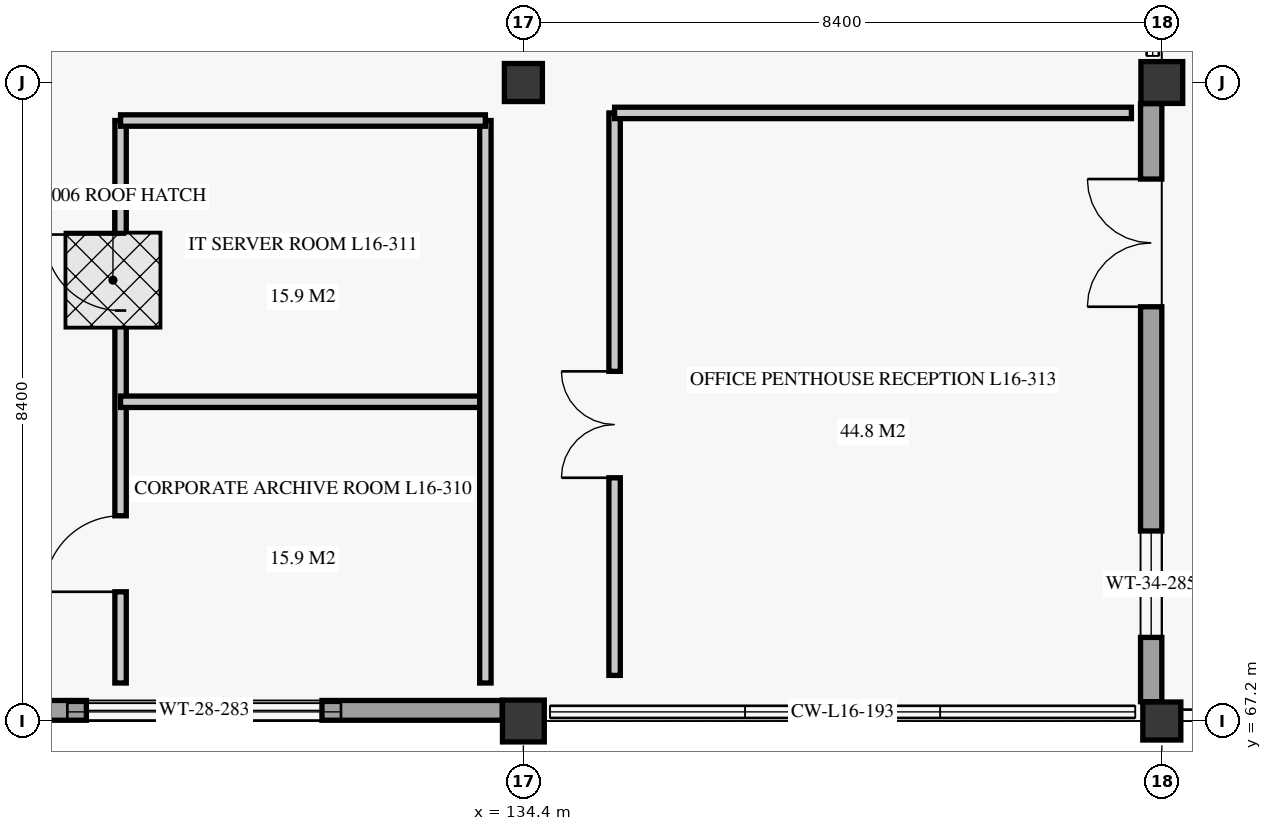
"""IFC4 building model, lengths in metres.
Left out: names, types, materials, properties, quantities, classifications, styles, units other than length and angle.
Written with IfcOpenShell. Run it as: python <this file> out.ifc"""

import sys

from ifc_helpers import new_model, si_unit, direction, frame, frame_2d, origin, origin_2d, place, context, subcontext, project, spatial, polyline, rectangle, outline, extrude, element, fill, save


model = new_model("IFC4")
c1 = context("Model", 3, precision=1e-05, world=origin(), true_north=direction((0.0, 1.0)))
c2 = subcontext(c1, "Body", "Model", "MODEL_VIEW")
j1 = project(units=[si_unit("LENGTHUNIT", "METRE"), si_unit("PLANEANGLEUNIT", "RADIAN")], contexts=[c1])
p1 = place(None, origin())
s1 = spatial("IfcSite", under=j1, at=p1, CompositionType="ELEMENT")
p2 = place(p1, origin())
s2 = spatial("IfcBuilding", under=s1, at=p2, CompositionType="ELEMENT")
p3 = place(p2, frame((0.0, 0.0, 66.7)))
s3 = spatial("IfcBuildingStorey", under=s2, at=p3, CompositionType="ELEMENT", Elevation=66.7)
p4 = place(p3, frame((134.4, 67.2, 0.0), z_axis=(0.0, 0.0, 1.0), x_axis=(1.0, 0.0, 0.0)))
e1 = element("IfcColumn", 1, at=p4, inside=s3, PredefinedType="COLUMN", context=c2, shape_type="SweptSolid", body=[
    extrude(rectangle(XDim=0.55, YDim=0.55, at=origin_2d()), origin(), (0.0, 0.0, 1.0), 4.22),
])
for number, where, z_axis, x_axis in (
    (2, (134.4, 75.6, 0.0), (0.0, 0.0, 1.0), (1.0, 0.0, 0.0)),
    (3, (142.8, 67.2, 0.0), (0.0, 0.0, 1.0), (1.0, 0.0, 0.0)),
):
    element("IfcColumn", number, at=place(p3, frame(where, z_axis=z_axis, x_axis=x_axis)), inside=s3, PredefinedType="COLUMN", context=c2, shape_type="SweptSolid", body=[
        extrude(rectangle(XDim=0.5, YDim=0.5, at=origin_2d()), origin(), (0.0, 0.0, 1.0), 4.22),
    ])
p5 = place(p3, frame((142.8, 75.6, 0.0), z_axis=(0.0, 0.0, 1.0), x_axis=(1.0, 0.0, 0.0)))
e4 = element("IfcColumn", 4, at=p5, inside=s3, PredefinedType="COLUMN", context=c2, shape_type="SweptSolid", body=[
    extrude(rectangle(XDim=0.55, YDim=0.55, at=origin_2d()), origin(), (0.0, 0.0, 1.0), 4.22),
])
p6 = place(p3, frame((126.254, 67.34, 0.0), z_axis=(0.0, 0.0, 1.0), x_axis=(1.0, 0.0, 0.0)))
e5 = element("IfcWall", 5, at=p6, inside=s3, PredefinedType="SOLIDWALL", context=c2, shape_type="SweptSolid", body=[
    extrude(rectangle(XDim=7.868, YDim=0.26, at=frame_2d((3.934, 0.0))), origin(), (0.0, 0.0, 1.0), 3.54),
])
p7 = place(p6, frame((2.396, 0.0, 0.85)))
e6 = element("IfcOpeningElement", 6, at=p7, cuts=e5, PredefinedType="OPENING", context=c2, shape_type="SweptSolid", body=[
    extrude(rectangle(XDim=3.1, YDim=1.85, at=frame_2d((1.55, 0.925))), frame((0.0, 0.14, 0.0), z_axis=(0.0, -1.0, 0.0), x_axis=(1.0, 0.0, 0.0)), (0.0, 0.0, 1.0), 0.28),
])
p8 = place(p3, frame((142.66, 67.454, 0.0), z_axis=(0.0, 0.0, 1.0), x_axis=(0.0, 1.0, 0.0)))
e7 = element("IfcWall", 7, at=p8, inside=s3, PredefinedType="SOLIDWALL", context=c2, shape_type="SweptSolid", body=[
    extrude(rectangle(XDim=7.868, YDim=0.28, at=frame_2d((3.934, 0.0))), origin(), (0.0, 0.0, 1.0), 3.54),
])
p9 = place(p8, frame((0.846, 0.0, 0.85)))
e8 = element("IfcOpeningElement", 8, at=p9, cuts=e7, PredefinedType="OPENING", context=c2, shape_type="SweptSolid", body=[
    extrude(rectangle(XDim=1.4, YDim=1.7, at=frame_2d((0.7, 0.85))), frame((0.0, 0.15, 0.0), z_axis=(0.0, -1.0, 0.0), x_axis=(1.0, 0.0, 0.0)), (0.0, 0.0, 1.0), 0.3),
])
p10 = place(p8, frame((5.196, 0.0, 0.0)))
e9 = element("IfcOpeningElement", 9, at=p10, cuts=e7, PredefinedType="OPENING", context=c2, shape_type="SweptSolid", body=[
    extrude(rectangle(XDim=1.68, YDim=2.3, at=frame_2d((0.84, 1.15))), frame((0.0, 0.15, 0.0), z_axis=(0.0, -1.0, 0.0), x_axis=(1.0, 0.0, 0.0)), (0.0, 0.0, 1.0), 0.3),
])
p11 = place(p3, frame((134.53, 67.32, 4.5), z_axis=(0.0, 0.0, 1.0), x_axis=(1.0, 0.0, 0.0)))
e10 = element("IfcWall", 10, at=p11, inside=s3, PredefinedType="SOLIDWALL", context=c2, shape_type="SweptSolid", body=[
    extrude(outline(polyline([(0.0, 0.0), (8.104, 0.0), (8.104, 3.0), (4.052, 3.6), (0.0, 4.2), (0.0, 0.0)])), frame((0.0, 0.115, 0.0), z_axis=(0.0, -1.0, 0.0), x_axis=(1.0, 0.0, 0.0)), (0.0, 0.0, 1.0), 0.23),
])
p12 = place(p3, frame((126.13, 67.32, 4.5), z_axis=(0.0, 0.0, 1.0), x_axis=(1.0, 0.0, 0.0)))
e11 = element("IfcWall", 11, at=p12, inside=s3, PredefinedType="SOLIDWALL", context=c2, shape_type="SweptSolid", body=[
    extrude(rectangle(XDim=8.14, YDim=0.23, at=frame_2d((4.07, 0.0))), origin(), (0.0, 0.0, 1.0), 3.15),
])
p13 = place(p12, frame((2.27, 0.0, 0.45)))
e12 = element("IfcOpeningElement", 12, at=p13, cuts=e11, PredefinedType="OPENING", context=c2, shape_type="SweptSolid", body=[
    extrude(rectangle(XDim=3.6, YDim=2.3, at=frame_2d((1.8, 1.15))), frame((0.0, 0.125, 0.0), z_axis=(0.0, -1.0, 0.0), x_axis=(1.0, 0.0, 0.0)), (0.0, 0.0, 1.0), 0.25),
])
p14 = place(p3, frame((142.68, 67.366, 4.5), z_axis=(0.0, 0.0, 1.0), x_axis=(0.0, 1.0, 0.0)))
e13 = element("IfcWall", 13, at=p14, inside=s3, PredefinedType="SOLIDWALL", context=c2, shape_type="SweptSolid", body=[
    extrude(rectangle(XDim=8.104, YDim=0.23, at=frame_2d((4.052, 0.0))), origin(), (0.0, 0.0, 1.0), 3.15),
])
p15 = place(p3, frame((142.68, 75.73, 4.5), z_axis=(0.0, 0.0, 1.0), x_axis=(0.0, 1.0, 0.0)))
e14 = element("IfcWall", 14, at=p15, inside=s3, PredefinedType="SOLIDWALL", context=c2, shape_type="SweptSolid", body=[
    extrude(rectangle(XDim=8.14, YDim=0.23, at=frame_2d((4.07, 0.0))), origin(), (0.0, 0.0, 1.0), 3.15),
])
p16 = place(p15, frame((2.72, 0.0, 0.5)))
e15 = element("IfcOpeningElement", 15, at=p16, cuts=e14, PredefinedType="OPENING", context=c2, shape_type="SweptSolid", body=[
    extrude(rectangle(XDim=2.7, YDim=2.2, at=frame_2d((1.35, 1.1))), frame((0.0, 0.125, 0.0), z_axis=(0.0, -1.0, 0.0), x_axis=(1.0, 0.0, 0.0)), (0.0, 0.0, 1.0), 0.25),
])
p17 = place(p3, frame((129.1, 67.7, 0.0), z_axis=(0.0, 0.0, 1.0), x_axis=(0.0, 1.0, 0.0)))
e16 = element("IfcWall", 16, at=p17, inside=s3, PredefinedType="PARTITIONING", context=c2, shape_type="SweptSolid", body=[
    extrude(rectangle(XDim=7.4, YDim=0.15, at=frame_2d((3.7, 0.0))), origin(), (0.0, 0.0, 1.0), 3.84),
])
p18 = place(p17, frame((1.2, 0.0, 0.0)))
e17 = element("IfcOpeningElement", 17, at=p18, cuts=e16, PredefinedType="OPENING", context=c2, shape_type="SweptSolid", body=[
    extrude(rectangle(XDim=1.0, YDim=2.1, at=frame_2d((0.5, 1.05))), frame((0.0, 0.085, 0.0), z_axis=(0.0, -1.0, 0.0), x_axis=(1.0, 0.0, 0.0)), (0.0, 0.0, 1.0), 0.17),
])
p19 = place(p17, frame((4.9, 0.0, 0.0)))
e18 = element("IfcOpeningElement", 18, at=p19, cuts=e16, PredefinedType="OPENING", context=c2, shape_type="SweptSolid", body=[
    extrude(rectangle(XDim=1.0, YDim=2.1, at=frame_2d((0.5, 1.05))), frame((0.0, 0.085, 0.0), z_axis=(0.0, -1.0, 0.0), x_axis=(1.0, 0.0, 0.0)), (0.0, 0.0, 1.0), 0.17),
])
p20 = place(p3, frame((129.1, 71.4, 0.0), z_axis=(0.0, 0.0, 1.0), x_axis=(1.0, 0.0, 0.0)))
e19 = element("IfcWall", 19, at=p20, inside=s3, PredefinedType="PARTITIONING", context=c2, shape_type="SweptSolid", body=[
    extrude(rectangle(XDim=4.8, YDim=0.15, at=frame_2d((2.4, 0.0))), origin(), (0.0, 0.0, 1.0), 3.84),
])
p21 = place(p3, frame((133.9, 67.7, 0.0), z_axis=(0.0, 0.0, 1.0), x_axis=(0.0, 1.0, 0.0)))
e20 = element("IfcWall", 20, at=p21, inside=s3, PredefinedType="PARTITIONING", context=c2, shape_type="SweptSolid", body=[
    extrude(rectangle(XDim=7.4, YDim=0.15, at=frame_2d((3.7, 0.0))), origin(), (0.0, 0.0, 1.0), 3.84),
])
p22 = place(p3, frame((129.1, 75.1, 0.0), z_axis=(0.0, 0.0, 1.0), x_axis=(1.0, 0.0, 0.0)))
e21 = element("IfcWall", 21, at=p22, inside=s3, PredefinedType="PARTITIONING", context=c2, shape_type="SweptSolid", body=[
    extrude(rectangle(XDim=4.8, YDim=0.15, at=frame_2d((2.4, 0.0))), origin(), (0.0, 0.0, 1.0), 3.84),
])
p23 = place(p3, frame((135.6, 67.8, 0.0), z_axis=(0.0, 0.0, 1.0), x_axis=(0.0, 1.0, 0.0)))
e22 = element("IfcWall", 22, at=p23, inside=s3, PredefinedType="PARTITIONING", context=c2, shape_type="SweptSolid", body=[
    extrude(rectangle(XDim=7.4, YDim=0.15, at=frame_2d((3.7, 0.0))), origin(), (0.0, 0.0, 1.0), 3.84),
])
p24 = place(p23, frame((2.6, 0.0, 0.0)))
e23 = element("IfcOpeningElement", 23, at=p24, cuts=e22, PredefinedType="OPENING", context=c2, shape_type="SweptSolid", body=[
    extrude(rectangle(XDim=1.4, YDim=2.35, at=frame_2d((0.7, 1.175))), frame((0.0, 0.085, 0.0), z_axis=(0.0, -1.0, 0.0), x_axis=(1.0, 0.0, 0.0)), (0.0, 0.0, 1.0), 0.17),
])
p25 = place(p3, frame((135.6, 75.2, 0.0), z_axis=(0.0, 0.0, 1.0), x_axis=(1.0, 0.0, 0.0)))
e24 = element("IfcWall", 24, at=p25, inside=s3, PredefinedType="PARTITIONING", context=c2, shape_type="SweptSolid", body=[
    extrude(rectangle(XDim=6.8, YDim=0.15, at=frame_2d((3.4, 0.0))), origin(), (0.0, 0.0, 1.0), 3.84),
])
p26 = place(p7, origin())
e25 = element("IfcWindow", 25, at=p26, inside=s3, PartitioningType="SINGLE_PANEL", PredefinedType="WINDOW", context=c2, shape_type="SweptSolid", body=[
    extrude(rectangle(XDim=3.1, YDim=1.85, at=frame_2d((1.55, 0.925))), frame((0.0, 0.03, 0.0), z_axis=(0.0, -1.0, 0.0), x_axis=(1.0, 0.0, 0.0)), (0.0, 0.0, 1.0), 0.06),
])
fill(e6, e25)
p27 = place(p9, origin())
e26 = element("IfcWindow", 26, at=p27, inside=s3, PartitioningType="SINGLE_PANEL", PredefinedType="WINDOW", context=c2, shape_type="SweptSolid", body=[
    extrude(rectangle(XDim=1.4, YDim=1.7, at=frame_2d((0.7, 0.85))), frame((0.0, 0.03, 0.0), z_axis=(0.0, -1.0, 0.0), x_axis=(1.0, 0.0, 0.0)), (0.0, 0.0, 1.0), 0.06),
])
fill(e8, e26)
p28 = place(p10, origin())
e27 = element("IfcDoor", 27, at=p28, inside=s3, OperationType="DOUBLE_DOOR_SINGLE_SWING", PredefinedType="DOOR", context=c2, shape_type="SweptSolid", body=[
    extrude(rectangle(XDim=1.68, YDim=2.3, at=frame_2d((0.84, 1.15))), frame((0.0, 0.025, 0.0), z_axis=(0.0, -1.0, 0.0), x_axis=(1.0, 0.0, 0.0)), (0.0, 0.0, 1.0), 0.05),
])
fill(e9, e27)
p29 = place(p13, origin())
e28 = element("IfcWindow", 28, at=p29, inside=s3, PartitioningType="SINGLE_PANEL", PredefinedType="WINDOW", context=c2, shape_type="SweptSolid", body=[
    extrude(rectangle(XDim=3.6, YDim=2.3, at=frame_2d((1.8, 1.15))), frame((0.0, 0.03, 0.0), z_axis=(0.0, -1.0, 0.0), x_axis=(1.0, 0.0, 0.0)), (0.0, 0.0, 1.0), 0.06),
])
fill(e12, e28)
p30 = place(p2, frame((0.0, 0.0, 74.78)))
p31 = place(p30, origin())
p32 = place(p31, frame((129.0, 73.0, 0.22)))
e29 = element("IfcDoor", 29, at=p32, inside=s3, OperationType="SINGLE_SWING_LEFT", PredefinedType="TRAPDOOR", context=c2, shape_type="SweptSolid", body=[
    extrude(rectangle(XDim=1.25, YDim=1.25, at=origin_2d()), origin(), (0.0, 0.0, 1.0), 0.05),
])
p33 = place(p18, origin())
e30 = element("IfcDoor", 30, at=p33, inside=s3, OperationType="SINGLE_SWING_LEFT", PredefinedType="DOOR", context=c2, shape_type="SweptSolid", body=[
    extrude(rectangle(XDim=1.0, YDim=2.1, at=frame_2d((0.5, 1.05))), frame((0.0, 0.025, 0.0), z_axis=(0.0, -1.0, 0.0), x_axis=(1.0, 0.0, 0.0)), (0.0, 0.0, 1.0), 0.05),
])
fill(e17, e30)
p34 = place(p19, origin())
e31 = element("IfcDoor", 31, at=p34, inside=s3, OperationType="SINGLE_SWING_RIGHT", PredefinedType="DOOR", context=c2, shape_type="SweptSolid", body=[
    extrude(rectangle(XDim=1.0, YDim=2.1, at=frame_2d((0.5, 1.05))), frame((0.0, 0.025, 0.0), z_axis=(0.0, -1.0, 0.0), x_axis=(1.0, 0.0, 0.0)), (0.0, 0.0, 1.0), 0.05),
])
fill(e18, e31)
p35 = place(p24, origin())
e32 = element("IfcDoor", 32, at=p35, inside=s3, OperationType="DOUBLE_DOOR_SINGLE_SWING", PredefinedType="DOOR", context=c2, shape_type="SweptSolid", body=[
    extrude(rectangle(XDim=1.4, YDim=2.35, at=frame_2d((0.7, 1.175))), frame((0.0, 0.025, 0.0), z_axis=(0.0, -1.0, 0.0), x_axis=(1.0, 0.0, 0.0)), (0.0, 0.0, 1.0), 0.05),
])
fill(e23, e32)
save(model, sys.argv[1])
